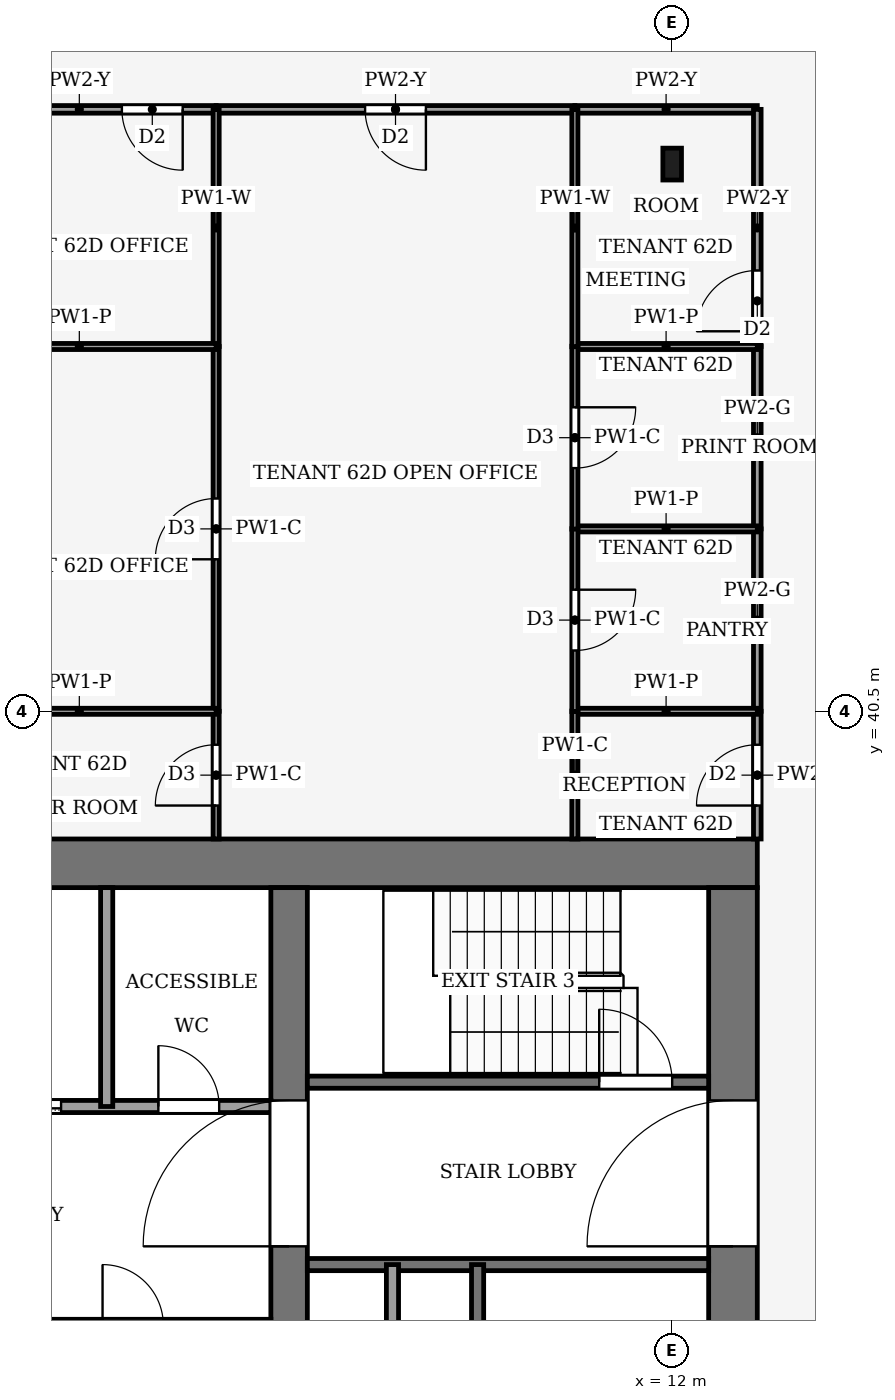
"""IFC4 building model, lengths in metres.
Left out: names, types, materials, properties, quantities, classifications, styles, units other than length and angle.
Written with IfcOpenShell. Run it as: python <this file> out.ifc"""

import sys

from ifc_helpers import new_model, si_unit, direction, frame, frame_2d, origin, origin_2d, place, context, subcontext, project, spatial, rectangle, i_section, extrude, element, fill, save


model = new_model("IFC4")
c1 = context("Model", 3, precision=1e-05, world=origin(), true_north=direction((0.0, 1.0)))
c2 = subcontext(c1, "Body", "Model", "MODEL_VIEW")
j1 = project(units=[si_unit("LENGTHUNIT", "METRE"), si_unit("PLANEANGLEUNIT", "RADIAN")], contexts=[c1])
p1 = place(None, origin())
s1 = spatial("IfcSite", under=j1, at=p1, CompositionType="ELEMENT")
p2 = place(p1, origin())
s2 = spatial("IfcBuilding", under=s1, at=p2, CompositionType="ELEMENT")
p3 = place(p2, frame((0.0, 0.0, 270.0)))
s3 = spatial("IfcBuildingStorey", under=s2, at=p3, CompositionType="ELEMENT", Elevation=270.0)
p4 = place(p3, frame((-13.4, 38.0, -0.13), z_axis=(0.0, 0.0, 1.0), x_axis=(1.0, 0.0, 0.0)))
e1 = element("IfcWall", 1, at=p4, inside=s3, PredefinedType="SHEAR", context=c2, shape_type="SweptSolid", body=[
    extrude(rectangle(XDim=26.8, YDim=0.8, at=frame_2d((13.4, 0.0))), origin(), (0.0, 0.0, 1.0), 4.0),
])
p5 = place(p3, frame((13.0, 18.4, -0.13), z_axis=(0.0, 0.0, 1.0), x_axis=(0.0, 1.0, 0.0)))
e2 = element("IfcWall", 2, at=p5, inside=s3, PredefinedType="SHEAR", context=c2, shape_type="SweptSolid", body=[
    extrude(rectangle(XDim=19.2, YDim=0.8, at=frame_2d((9.6, 0.0))), origin(), (0.0, 0.0, 1.0), 4.0),
])
p6 = place(p5, frame((2.8, 0.0, 0.13)))
e3 = element("IfcOpeningElement", 3, at=p6, cuts=e2, PredefinedType="OPENING", context=c2, shape_type="SweptSolid", body=[
    extrude(rectangle(XDim=2.4, YDim=2.4, at=frame_2d((1.2, 1.2))), frame((0.0, 0.41, 0.0), z_axis=(0.0, -1.0, 0.0), x_axis=(1.0, 0.0, 0.0)), (0.0, 0.0, 1.0), 0.82),
])
p7 = place(p5, frame((13.3, 0.0, 0.13)))
e4 = element("IfcOpeningElement", 4, at=p7, cuts=e2, PredefinedType="OPENING", context=c2, shape_type="SweptSolid", body=[
    extrude(rectangle(XDim=2.4, YDim=2.4, at=frame_2d((1.2, 1.2))), frame((0.0, 0.41, 0.0), z_axis=(0.0, -1.0, 0.0), x_axis=(1.0, 0.0, 0.0)), (0.0, 0.0, 1.0), 0.82),
])
p8 = place(p3, frame((5.7, 18.4, -0.13), z_axis=(0.0, 0.0, 1.0), x_axis=(0.0, 1.0, 0.0)))
e5 = element("IfcWall", 5, at=p8, inside=s3, PredefinedType="SHEAR", context=c2, shape_type="SweptSolid", body=[
    extrude(rectangle(XDim=19.2, YDim=0.6, at=frame_2d((9.6, 0.0))), origin(), (0.0, 0.0, 1.0), 4.0),
])
p9 = place(p8, frame((13.3, 0.0, 0.13)))
e6 = element("IfcOpeningElement", 6, at=p9, cuts=e5, PredefinedType="OPENING", context=c2, shape_type="SweptSolid", body=[
    extrude(rectangle(XDim=2.4, YDim=2.4, at=frame_2d((1.2, 1.2))), frame((0.0, 0.31, 0.0), z_axis=(0.0, -1.0, 0.0), x_axis=(1.0, 0.0, 0.0)), (0.0, 0.0, 1.0), 0.62),
])
p10 = place(p3, frame((12.0, 49.5, 0.0), z_axis=(0.0, 0.0, 1.0), x_axis=(1.0, 0.0, 0.0)))
e7 = element("IfcColumn", 7, at=p10, inside=s3, PredefinedType="COLUMN", context=c2, shape_type="SweptSolid", body=[
    extrude(i_section(OverallWidth=0.306, OverallDepth=0.524, WebThickness=0.012, FlangeThickness=0.04, FilletRadius=0.027, at=origin_2d()), origin(), (0.0, 0.0, 1.0), 4.0),
])
p11 = place(p3, frame((6.0, 31.4, 0.0), z_axis=(0.0, 0.0, 1.0), x_axis=(1.0, 0.0, 0.0)))
e8 = element("IfcWall", 8, at=p11, inside=s3, PredefinedType="PARTITIONING", context=c2, shape_type="SweptSolid", body=[
    extrude(rectangle(XDim=6.6, YDim=0.2, at=frame_2d((3.3, 0.0))), origin(), (0.0, 0.0, 1.0), 3.87),
])
p12 = place(p3, frame((-5.4, 34.0, 0.0), z_axis=(0.0, 0.0, 1.0), x_axis=(1.0, 0.0, 0.0)))
e9 = element("IfcWall", 9, at=p12, inside=s3, PredefinedType="PARTITIONING", context=c2, shape_type="SweptSolid", body=[
    extrude(rectangle(XDim=10.8, YDim=0.2, at=frame_2d((5.4, 0.0))), origin(), (0.0, 0.0, 1.0), 3.87),
])
p13 = place(p12, frame((6.15, 0.0, 0.0)))
e10 = element("IfcOpeningElement", 10, at=p13, cuts=e9, PredefinedType="OPENING", context=c2, shape_type="SweptSolid", body=[
    extrude(rectangle(XDim=1.2, YDim=2.2, at=frame_2d((0.6, 1.1))), frame((0.0, 0.11, 0.0), z_axis=(0.0, -1.0, 0.0), x_axis=(1.0, 0.0, 0.0)), (0.0, 0.0, 1.0), 0.22),
])
p14 = place(p12, frame((8.95, 0.0, 0.0)))
e11 = element("IfcOpeningElement", 11, at=p14, cuts=e9, PredefinedType="OPENING", context=c2, shape_type="SweptSolid", body=[
    extrude(rectangle(XDim=1.0, YDim=2.1, at=frame_2d((0.5, 1.05))), frame((0.0, 0.11, 0.0), z_axis=(0.0, -1.0, 0.0), x_axis=(1.0, 0.0, 0.0)), (0.0, 0.0, 1.0), 0.22),
])
p15 = place(p3, frame((6.0, 34.4, 0.0), z_axis=(0.0, 0.0, 1.0), x_axis=(1.0, 0.0, 0.0)))
e12 = element("IfcWall", 12, at=p15, inside=s3, PredefinedType="PARTITIONING", context=c2, shape_type="SweptSolid", body=[
    extrude(rectangle(XDim=6.6, YDim=0.2, at=frame_2d((3.3, 0.0))), origin(), (0.0, 0.0, 1.0), 3.87),
])
p16 = place(p15, frame((4.8, 0.0, 0.0)))
e13 = element("IfcOpeningElement", 13, at=p16, cuts=e12, PredefinedType="OPENING", context=c2, shape_type="SweptSolid", body=[
    extrude(rectangle(XDim=1.2, YDim=2.2, at=frame_2d((0.6, 1.1))), frame((0.0, 0.11, 0.0), z_axis=(0.0, -1.0, 0.0), x_axis=(1.0, 0.0, 0.0)), (0.0, 0.0, 1.0), 0.22),
])
p17 = place(p3, frame((2.7, 34.0, 0.0), z_axis=(0.0, 0.0, 1.0), x_axis=(0.0, 1.0, 0.0)))
e14 = element("IfcWall", 14, at=p17, inside=s3, PredefinedType="PARTITIONING", context=c2, shape_type="SweptSolid", body=[
    extrude(rectangle(XDim=3.6, YDim=0.2, at=frame_2d((1.8, 0.0))), origin(), (0.0, 0.0, 1.0), 3.87),
])
for number, where, z_axis, x_axis in (
    (15, (7.4, 24.0, 0.0), (0.0, 0.0, 1.0), (0.0, 1.0, 0.0)),
    (16, (8.8, 24.0, 0.0), (0.0, 0.0, 1.0), (0.0, 1.0, 0.0)),
):
    element("IfcWall", number, at=place(p3, frame(where, z_axis=z_axis, x_axis=x_axis)), inside=s3, PredefinedType="PARTITIONING", context=c2, shape_type="SweptSolid", body=[
        extrude(rectangle(XDim=7.4, YDim=0.2, at=frame_2d((3.7, 0.0))), origin(), (0.0, 0.0, 1.0), 3.87),
    ])
p18 = place(p3, frame((13.4, 38.4, 0.0), z_axis=(0.0, 0.0, 1.0), x_axis=(0.0, 1.0, 0.0)))
e17 = element("IfcWall", 17, at=p18, inside=s3, PredefinedType="PARTITIONING", context=c2, shape_type="SweptSolid", body=[
    extrude(rectangle(XDim=2.1, YDim=0.125, at=frame_2d((1.05, 0.0))), origin(), (0.0, 0.0, 1.0), 3.14),
])
p19 = place(p18, frame((0.55, 0.0, 0.0)))
e18 = element("IfcOpeningElement", 18, at=p19, cuts=e17, PredefinedType="OPENING", context=c2, shape_type="SweptSolid", body=[
    extrude(rectangle(XDim=1.0, YDim=2.1, at=frame_2d((0.5, 1.05))), frame((0.0, 0.073, 0.0), z_axis=(0.0, -1.0, 0.0), x_axis=(1.0, 0.0, 0.0)), (0.0, 0.0, 1.0), 0.145),
])
for number, where, z_axis, x_axis in (
    (19, (13.4, 40.5, 0.0), (0.0, 0.0, 1.0), (0.0, 1.0, 0.0)),
    (20, (13.4, 43.5, 0.0), (0.0, 0.0, 1.0), (0.0, 1.0, 0.0)),
):
    element("IfcWall", number, at=place(p3, frame(where, z_axis=z_axis, x_axis=x_axis)), inside=s3, PredefinedType="PARTITIONING", context=c2, shape_type="SweptSolid", body=[
        extrude(rectangle(XDim=3.0, YDim=0.125, at=frame_2d((1.5, 0.0))), origin(), (0.0, 0.0, 1.0), 3.87),
    ])
p20 = place(p3, frame((13.4, 50.4, 0.0), z_axis=(0.0, 0.0, 1.0), x_axis=(-1.0, 0.0, 0.0)))
e21 = element("IfcWall", 21, at=p20, inside=s3, PredefinedType="PARTITIONING", context=c2, shape_type="SweptSolid", body=[
    extrude(rectangle(XDim=3.0, YDim=0.125, at=frame_2d((1.5, 0.0))), origin(), (0.0, 0.0, 1.0), 3.24),
])
p21 = place(p3, frame((13.4, 46.5, 0.0), z_axis=(0.0, 0.0, 1.0), x_axis=(0.0, 1.0, 0.0)))
e22 = element("IfcWall", 22, at=p21, inside=s3, PredefinedType="PARTITIONING", context=c2, shape_type="SweptSolid", body=[
    extrude(rectangle(XDim=3.9, YDim=0.125, at=frame_2d((1.95, 0.0))), origin(), (0.0, 0.0, 1.0), 3.24),
])
p22 = place(p21, frame((0.25, 0.0, 0.0)))
e23 = element("IfcOpeningElement", 23, at=p22, cuts=e22, PredefinedType="OPENING", context=c2, shape_type="SweptSolid", body=[
    extrude(rectangle(XDim=1.0, YDim=2.1, at=frame_2d((0.5, 1.05))), frame((0.0, 0.073, 0.0), z_axis=(0.0, -1.0, 0.0), x_axis=(1.0, 0.0, 0.0)), (0.0, 0.0, 1.0), 0.145),
])
p23 = place(p3, frame((10.4, 50.4, 0.0), z_axis=(0.0, 0.0, 1.0), x_axis=(-1.0, 0.0, 0.0)))
e24 = element("IfcWall", 24, at=p23, inside=s3, PredefinedType="PARTITIONING", context=c2, shape_type="SweptSolid", body=[
    extrude(rectangle(XDim=5.9, YDim=0.125, at=frame_2d((2.95, 0.0))), origin(), (0.0, 0.0, 1.0), 3.24),
])
p24 = place(p23, frame((2.45, 0.0, 0.0)))
e25 = element("IfcOpeningElement", 25, at=p24, cuts=e24, PredefinedType="OPENING", context=c2, shape_type="SweptSolid", body=[
    extrude(rectangle(XDim=1.0, YDim=2.1, at=frame_2d((0.5, 1.05))), frame((0.0, 0.073, 0.0), z_axis=(0.0, -1.0, 0.0), x_axis=(1.0, 0.0, 0.0)), (0.0, 0.0, 1.0), 0.145),
])
p25 = place(p3, frame((4.5, 50.4, 0.0), z_axis=(0.0, 0.0, 1.0), x_axis=(-1.0, 0.0, 0.0)))
e26 = element("IfcWall", 26, at=p25, inside=s3, PredefinedType="PARTITIONING", context=c2, shape_type="SweptSolid", body=[
    extrude(rectangle(XDim=4.5, YDim=0.125, at=frame_2d((2.25, 0.0))), origin(), (0.0, 0.0, 1.0), 3.24),
])
p26 = place(p25, frame((0.55, 0.0, 0.0)))
e27 = element("IfcOpeningElement", 27, at=p26, cuts=e26, PredefinedType="OPENING", context=c2, shape_type="SweptSolid", body=[
    extrude(rectangle(XDim=1.0, YDim=2.1, at=frame_2d((0.5, 1.05))), frame((0.0, 0.073, 0.0), z_axis=(0.0, -1.0, 0.0), x_axis=(1.0, 0.0, 0.0)), (0.0, 0.0, 1.0), 0.145),
])
p27 = place(p3, frame((13.4, 40.5, 0.0), z_axis=(0.0, 0.0, 1.0), x_axis=(-1.0, 0.0, 0.0)))
e28 = element("IfcWall", 28, at=p27, inside=s3, PredefinedType="PARTITIONING", context=c2, shape_type="SweptSolid", body=[
    extrude(rectangle(XDim=3.0, YDim=0.1, at=frame_2d((1.5, 0.0))), origin(), (0.0, 0.0, 1.0), 3.44),
])
p28 = place(p3, frame((10.4, 40.504, 0.0), z_axis=(0.0, 0.0, 1.0), x_axis=(0.0, -1.0, 0.0)))
e29 = element("IfcWall", 29, at=p28, inside=s3, PredefinedType="PARTITIONING", context=c2, shape_type="SweptSolid", body=[
    extrude(rectangle(XDim=2.104, YDim=0.1, at=frame_2d((1.052, 0.0))), origin(), (0.0, 0.0, 1.0), 3.87),
])
p29 = place(p3, frame((13.4, 43.5, 0.0), z_axis=(0.0, 0.0, 1.0), x_axis=(-1.0, 0.0, 0.0)))
e30 = element("IfcWall", 30, at=p29, inside=s3, PredefinedType="PARTITIONING", context=c2, shape_type="SweptSolid", body=[
    extrude(rectangle(XDim=3.0, YDim=0.1, at=frame_2d((1.5, 0.0))), origin(), (0.0, 0.0, 1.0), 3.44),
])
p30 = place(p3, frame((10.4, 43.504, 0.0), z_axis=(0.0, 0.0, 1.0), x_axis=(0.0, -1.0, 0.0)))
e31 = element("IfcWall", 31, at=p30, inside=s3, PredefinedType="PARTITIONING", context=c2, shape_type="SweptSolid", body=[
    extrude(rectangle(XDim=3.008, YDim=0.1, at=frame_2d((1.504, 0.0))), origin(), (0.0, 0.0, 1.0), 3.87),
])
p31 = place(p30, frame((1.004, 0.0, 0.0)))
e32 = element("IfcOpeningElement", 32, at=p31, cuts=e31, PredefinedType="OPENING", context=c2, shape_type="SweptSolid", body=[
    extrude(rectangle(XDim=1.0, YDim=2.1, at=frame_2d((0.5, 1.05))), frame((0.0, 0.06, 0.0), z_axis=(0.0, -1.0, 0.0), x_axis=(1.0, 0.0, 0.0)), (0.0, 0.0, 1.0), 0.12),
])
p32 = place(p3, frame((13.4, 46.5, 0.0), z_axis=(0.0, 0.0, 1.0), x_axis=(-1.0, 0.0, 0.0)))
e33 = element("IfcWall", 33, at=p32, inside=s3, PredefinedType="PARTITIONING", context=c2, shape_type="SweptSolid", body=[
    extrude(rectangle(XDim=3.0, YDim=0.1, at=frame_2d((1.5, 0.0))), origin(), (0.0, 0.0, 1.0), 3.44),
])
p33 = place(p3, frame((10.4, 46.504, 0.0), z_axis=(0.0, 0.0, 1.0), x_axis=(0.0, -1.0, 0.0)))
e34 = element("IfcWall", 34, at=p33, inside=s3, PredefinedType="PARTITIONING", context=c2, shape_type="SweptSolid", body=[
    extrude(rectangle(XDim=3.008, YDim=0.1, at=frame_2d((1.504, 0.0))), origin(), (0.0, 0.0, 1.0), 3.87),
])
p34 = place(p33, frame((1.004, 0.0, 0.0)))
e35 = element("IfcOpeningElement", 35, at=p34, cuts=e34, PredefinedType="OPENING", context=c2, shape_type="SweptSolid", body=[
    extrude(rectangle(XDim=1.0, YDim=2.1, at=frame_2d((0.5, 1.05))), frame((0.0, 0.06, 0.0), z_axis=(0.0, -1.0, 0.0), x_axis=(1.0, 0.0, 0.0)), (0.0, 0.0, 1.0), 0.12),
])
p35 = place(p3, frame((10.4, 50.4, 0.0), z_axis=(0.0, 0.0, 1.0), x_axis=(0.0, -1.0, 0.0)))
e36 = element("IfcWall", 36, at=p35, inside=s3, PredefinedType="PARTITIONING", context=c2, shape_type="SweptSolid", body=[
    extrude(rectangle(XDim=3.904, YDim=0.1, at=frame_2d((1.952, 0.0))), origin(), (0.0, 0.0, 1.0), 3.24),
])
p36 = place(p3, frame((4.5, 38.4, 0.0), z_axis=(0.0, 0.0, 1.0), x_axis=(0.0, 1.0, 0.0)))
e37 = element("IfcWall", 37, at=p36, inside=s3, PredefinedType="PARTITIONING", context=c2, shape_type="SweptSolid", body=[
    extrude(rectangle(XDim=2.1, YDim=0.1, at=frame_2d((1.05, 0.0))), origin(), (0.0, 0.0, 1.0), 3.87),
])
p37 = place(p36, frame((0.55, 0.0, 0.0)))
e38 = element("IfcOpeningElement", 38, at=p37, cuts=e37, PredefinedType="OPENING", context=c2, shape_type="SweptSolid", body=[
    extrude(rectangle(XDim=1.0, YDim=2.1, at=frame_2d((0.5, 1.05))), frame((0.0, 0.06, 0.0), z_axis=(0.0, -1.0, 0.0), x_axis=(1.0, 0.0, 0.0)), (0.0, 0.0, 1.0), 0.12),
])
p38 = place(p3, frame((4.5, 40.5, 0.0), z_axis=(0.0, 0.0, 1.0), x_axis=(0.0, 1.0, 0.0)))
e39 = element("IfcWall", 39, at=p38, inside=s3, PredefinedType="PARTITIONING", context=c2, shape_type="SweptSolid", body=[
    extrude(rectangle(XDim=6.0, YDim=0.1, at=frame_2d((3.0, 0.0))), origin(), (0.0, 0.0, 1.0), 3.87),
])
p39 = place(p38, frame((2.5, 0.0, 0.0)))
e40 = element("IfcOpeningElement", 40, at=p39, cuts=e39, PredefinedType="OPENING", context=c2, shape_type="SweptSolid", body=[
    extrude(rectangle(XDim=1.0, YDim=2.1, at=frame_2d((0.5, 1.05))), frame((0.0, 0.06, 0.0), z_axis=(0.0, -1.0, 0.0), x_axis=(1.0, 0.0, 0.0)), (0.0, 0.0, 1.0), 0.12),
])
p40 = place(p3, frame((4.5, 50.4, 0.0), z_axis=(0.0, 0.0, 1.0), x_axis=(0.0, -1.0, 0.0)))
e41 = element("IfcWall", 41, at=p40, inside=s3, PredefinedType="PARTITIONING", context=c2, shape_type="SweptSolid", body=[
    extrude(rectangle(XDim=3.9, YDim=0.1, at=frame_2d((1.95, 0.0))), origin(), (0.0, 0.0, 1.0), 3.24),
])
for number, where, z_axis, x_axis in (
    (42, (4.5, 40.5, 0.0), (0.0, 0.0, 1.0), (-1.0, 0.0, 0.0)),
    (43, (4.5, 46.5, 0.0), (0.0, 0.0, 1.0), (-1.0, 0.0, 0.0)),
):
    element("IfcWall", number, at=place(p3, frame(where, z_axis=z_axis, x_axis=x_axis)), inside=s3, PredefinedType="PARTITIONING", context=c2, shape_type="SweptSolid", body=[
        extrude(rectangle(XDim=4.5, YDim=0.1, at=frame_2d((2.25, 0.0))), origin(), (0.0, 0.0, 1.0), 3.44),
    ])
p41 = place(p13, origin())
e44 = element("IfcDoor", 44, at=p41, inside=s3, OperationType="SLIDING_TO_LEFT", PredefinedType="DOOR", context=c2, shape_type="SweptSolid", body=[
    extrude(rectangle(XDim=1.2, YDim=2.2, at=frame_2d((0.6, 1.1))), frame((0.0, 0.025, 0.0), z_axis=(0.0, -1.0, 0.0), x_axis=(1.0, 0.0, 0.0)), (0.0, 0.0, 1.0), 0.05),
])
fill(e10, e44)
p42 = place(p14, origin())
e45 = element("IfcDoor", 45, at=p42, inside=s3, OperationType="SINGLE_SWING_LEFT", PredefinedType="DOOR", context=c2, shape_type="SweptSolid", body=[
    extrude(rectangle(XDim=1.0, YDim=2.1, at=frame_2d((0.5, 1.05))), frame((0.0, 0.025, 0.0), z_axis=(0.0, -1.0, 0.0), x_axis=(1.0, 0.0, 0.0)), (0.0, 0.0, 1.0), 0.05),
])
fill(e11, e45)
p43 = place(p16, origin())
e46 = element("IfcDoor", 46, at=p43, inside=s3, OperationType="SINGLE_SWING_RIGHT", PredefinedType="DOOR", context=c2, shape_type="SweptSolid", body=[
    extrude(rectangle(XDim=1.2, YDim=2.2, at=frame_2d((0.6, 1.1))), frame((0.0, 0.025, 0.0), z_axis=(0.0, -1.0, 0.0), x_axis=(1.0, 0.0, 0.0)), (0.0, 0.0, 1.0), 0.05),
])
fill(e13, e46)
p44 = place(p9, origin())
e47 = element("IfcDoor", 47, at=p44, inside=s3, OperationType="DOUBLE_DOOR_SINGLE_SWING", PredefinedType="DOOR", context=c2, shape_type="SweptSolid", body=[
    extrude(rectangle(XDim=2.4, YDim=2.4, at=frame_2d((1.2, 1.2))), frame((0.0, 0.025, 0.0), z_axis=(0.0, -1.0, 0.0), x_axis=(1.0, 0.0, 0.0)), (0.0, 0.0, 1.0), 0.05),
])
fill(e6, e47)
p45 = place(p7, origin())
e48 = element("IfcDoor", 48, at=p45, inside=s3, OperationType="DOUBLE_DOOR_SINGLE_SWING", PredefinedType="DOOR", context=c2, shape_type="SweptSolid", body=[
    extrude(rectangle(XDim=2.4, YDim=2.4, at=frame_2d((1.2, 1.2))), frame((0.0, 0.025, 0.0), z_axis=(0.0, -1.0, 0.0), x_axis=(1.0, 0.0, 0.0)), (0.0, 0.0, 1.0), 0.05),
])
fill(e4, e48)
p46 = place(p19, origin())
e49 = element("IfcDoor", 49, at=p46, inside=s3, OperationType="SINGLE_SWING_LEFT", PredefinedType="DOOR", context=c2, shape_type="SweptSolid", body=[
    extrude(rectangle(XDim=1.0, YDim=2.1, at=frame_2d((0.5, 1.05))), frame((0.0, 0.025, 0.0), z_axis=(0.0, -1.0, 0.0), x_axis=(1.0, 0.0, 0.0)), (0.0, 0.0, 1.0), 0.05),
])
fill(e18, e49)
p47 = place(p22, origin())
e50 = element("IfcDoor", 50, at=p47, inside=s3, OperationType="SINGLE_SWING_LEFT", PredefinedType="DOOR", context=c2, shape_type="SweptSolid", body=[
    extrude(rectangle(XDim=1.0, YDim=2.1, at=frame_2d((0.5, 1.05))), frame((0.0, 0.025, 0.0), z_axis=(0.0, -1.0, 0.0), x_axis=(1.0, 0.0, 0.0)), (0.0, 0.0, 1.0), 0.05),
])
fill(e23, e50)
p48 = place(p24, origin())
e51 = element("IfcDoor", 51, at=p48, inside=s3, OperationType="SINGLE_SWING_LEFT", PredefinedType="DOOR", context=c2, shape_type="SweptSolid", body=[
    extrude(rectangle(XDim=1.0, YDim=2.1, at=frame_2d((0.5, 1.05))), frame((0.0, 0.025, 0.0), z_axis=(0.0, -1.0, 0.0), x_axis=(1.0, 0.0, 0.0)), (0.0, 0.0, 1.0), 0.05),
])
fill(e25, e51)
p49 = place(p26, origin())
e52 = element("IfcDoor", 52, at=p49, inside=s3, OperationType="SINGLE_SWING_LEFT", PredefinedType="DOOR", context=c2, shape_type="SweptSolid", body=[
    extrude(rectangle(XDim=1.0, YDim=2.1, at=frame_2d((0.5, 1.05))), frame((0.0, 0.025, 0.0), z_axis=(0.0, -1.0, 0.0), x_axis=(1.0, 0.0, 0.0)), (0.0, 0.0, 1.0), 0.05),
])
fill(e27, e52)
p50 = place(p31, origin())
e53 = element("IfcDoor", 53, at=p50, inside=s3, OperationType="SINGLE_SWING_RIGHT", PredefinedType="DOOR", context=c2, shape_type="SweptSolid", body=[
    extrude(rectangle(XDim=1.0, YDim=2.1, at=frame_2d((0.5, 1.05))), frame((0.0, 0.025, 0.0), z_axis=(0.0, -1.0, 0.0), x_axis=(1.0, 0.0, 0.0)), (0.0, 0.0, 1.0), 0.05),
])
fill(e32, e53)
p51 = place(p34, origin())
e54 = element("IfcDoor", 54, at=p51, inside=s3, OperationType="SINGLE_SWING_LEFT", PredefinedType="DOOR", context=c2, shape_type="SweptSolid", body=[
    extrude(rectangle(XDim=1.0, YDim=2.1, at=frame_2d((0.5, 1.05))), frame((0.0, 0.025, 0.0), z_axis=(0.0, -1.0, 0.0), x_axis=(1.0, 0.0, 0.0)), (0.0, 0.0, 1.0), 0.05),
])
fill(e35, e54)
p52 = place(p37, origin())
e55 = element("IfcDoor", 55, at=p52, inside=s3, OperationType="SINGLE_SWING_RIGHT", PredefinedType="DOOR", context=c2, shape_type="SweptSolid", body=[
    extrude(rectangle(XDim=1.0, YDim=2.1, at=frame_2d((0.5, 1.05))), frame((0.0, 0.025, 0.0), z_axis=(0.0, -1.0, 0.0), x_axis=(1.0, 0.0, 0.0)), (0.0, 0.0, 1.0), 0.05),
])
fill(e38, e55)
p53 = place(p39, origin())
e56 = element("IfcDoor", 56, at=p53, inside=s3, OperationType="SINGLE_SWING_LEFT", PredefinedType="DOOR", context=c2, shape_type="SweptSolid", body=[
    extrude(rectangle(XDim=1.0, YDim=2.1, at=frame_2d((0.5, 1.05))), frame((0.0, 0.025, 0.0), z_axis=(0.0, -1.0, 0.0), x_axis=(1.0, 0.0, 0.0)), (0.0, 0.0, 1.0), 0.05),
])
fill(e40, e56)
save(model, sys.argv[1])
